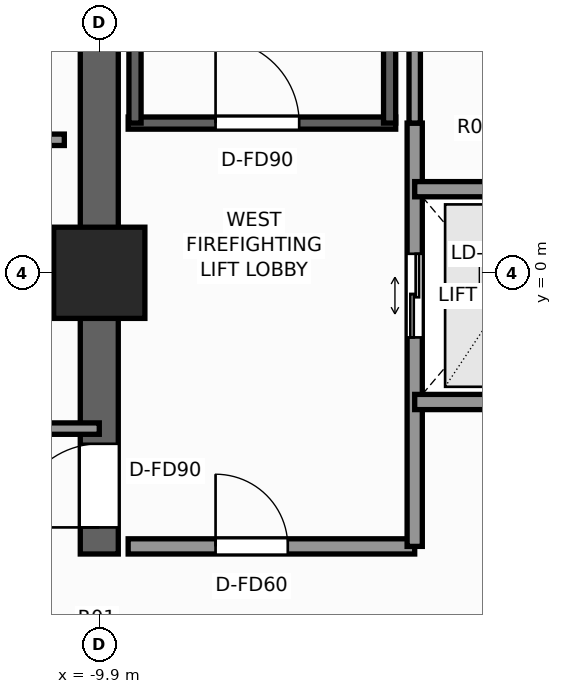
"""IFC4 building model, lengths in metres.
Left out: names, types, materials, properties, quantities, classifications, styles, units other than length and angle.
Written with IfcOpenShell. Run it as: python <this file> out.ifc"""

import sys

from ifc_helpers import new_model, si_unit, direction, frame, frame_2d, origin, origin_2d, place, context, subcontext, project, spatial, rectangle, extrude, element, fill, save


model = new_model("IFC4")
c1 = context("Model", 3, precision=1e-05, world=origin(), true_north=direction((0.0, 1.0)))
c2 = subcontext(c1, "Body", "Model", "MODEL_VIEW")
j1 = project(units=[si_unit("LENGTHUNIT", "METRE"), si_unit("PLANEANGLEUNIT", "RADIAN")], contexts=[c1])
p1 = place(None, origin())
s1 = spatial("IfcSite", under=j1, at=p1, CompositionType="ELEMENT")
p2 = place(p1, origin())
s2 = spatial("IfcBuilding", under=s1, at=p2, CompositionType="ELEMENT")
p3 = place(p2, frame((0.0, 0.0, 125.0)))
s3 = spatial("IfcBuildingStorey", under=s2, at=p3, CompositionType="ELEMENT", Elevation=125.0)
p4 = place(p3, frame((-9.9, -3.7, 0.0), z_axis=(0.0, 0.0, 1.0), x_axis=(0.0, 1.0, 0.0)))
e1 = element("IfcWall", 1, at=p4, inside=s3, PredefinedType="SHEAR", context=c2, shape_type="SweptSolid", body=[
    extrude(rectangle(XDim=13.35, YDim=0.5, at=frame_2d((6.675, 0.0))), origin(), (0.0, 0.0, 1.0), 3.3),
])
p5 = place(p4, frame((0.35, 0.0, 0.0)))
e2 = element("IfcOpeningElement", 2, at=p5, cuts=e1, PredefinedType="OPENING", context=c2, shape_type="SweptSolid", body=[
    extrude(rectangle(XDim=1.1, YDim=2.2, at=frame_2d((0.55, 1.1))), frame((0.0, 0.26, 0.0), z_axis=(0.0, -1.0, 0.0), x_axis=(1.0, 0.0, 0.0)), (0.0, 0.0, 1.0), 0.52),
])
p6 = place(p3, frame((-9.9, 0.0, 0.0), z_axis=(0.0, 0.0, 1.0), x_axis=(1.0, 0.0, 0.0)))
e3 = element("IfcColumn", 3, at=p6, inside=s3, PredefinedType="COLUMN", context=c2, shape_type="SweptSolid", body=[
    extrude(rectangle(XDim=1.2, YDim=1.2, at=origin_2d()), origin(), (0.0, 0.0, 1.0), 3.3),
])
p7 = place(p3, frame((-9.52, 1.97, 0.0), z_axis=(0.0, 0.0, 1.0), x_axis=(1.0, 0.0, 0.0)))
e4 = element("IfcWall", 4, at=p7, inside=s3, PredefinedType="SHEAR", context=c2, shape_type="SweptSolid", body=[
    extrude(rectangle(XDim=3.52, YDim=0.16, at=frame_2d((1.76, 0.0))), origin(), (0.0, 0.0, 1.0), 3.3),
])
p8 = place(p7, frame((1.15, 0.0, 0.0)))
e5 = element("IfcOpeningElement", 5, at=p8, cuts=e4, PredefinedType="OPENING", context=c2, shape_type="SweptSolid", body=[
    extrude(rectangle(XDim=1.1, YDim=2.2, at=frame_2d((0.55, 1.1))), frame((0.0, 0.09, 0.0), z_axis=(0.0, -1.0, 0.0), x_axis=(1.0, 0.0, 0.0)), (0.0, 0.0, 1.0), 0.18),
])
for number, where, z_axis, x_axis in (
    (6, (-9.43, 1.97, 0.0), (0.0, 0.0, 1.0), (0.0, 1.0, 0.0)),
    (7, (-6.08, 1.97, 0.0), (0.0, 0.0, 1.0), (0.0, 1.0, 0.0)),
):
    element("IfcWall", number, at=place(p3, frame(where, z_axis=z_axis, x_axis=x_axis)), inside=s3, PredefinedType="SHEAR", context=c2, shape_type="SweptSolid", body=[
        extrude(rectangle(XDim=7.56, YDim=0.16, at=frame_2d((3.78, 0.0))), origin(), (0.0, 0.0, 1.0), 3.3),
    ])
p9 = place(p3, frame((-9.52, -3.6, 0.0), z_axis=(0.0, 0.0, 1.0), x_axis=(1.0, 0.0, 0.0)))
e8 = element("IfcWall", 8, at=p9, inside=s3, PredefinedType="SOLIDWALL", context=c2, shape_type="SweptSolid", body=[
    extrude(rectangle(XDim=3.77, YDim=0.2, at=frame_2d((1.885, 0.0))), origin(), (0.0, 0.0, 1.0), 3.1),
])
p10 = place(p9, frame((1.15, 0.0, 0.0)))
e9 = element("IfcOpeningElement", 9, at=p10, cuts=e8, PredefinedType="OPENING", context=c2, shape_type="SweptSolid", body=[
    extrude(rectangle(XDim=0.95, YDim=2.06, at=frame_2d((0.475, 1.03))), frame((0.0, 0.11, 0.0), z_axis=(0.0, -1.0, 0.0), x_axis=(1.0, 0.0, 0.0)), (0.0, 0.0, 1.0), 0.22),
])
p11 = place(p3, frame((-5.75, -3.6, 0.0), z_axis=(0.0, 0.0, 1.0), x_axis=(0.0, 1.0, 0.0)))
e10 = element("IfcWall", 10, at=p11, inside=s3, PredefinedType="SOLIDWALL", context=c2, shape_type="SweptSolid", body=[
    extrude(rectangle(XDim=5.57, YDim=0.2, at=frame_2d((2.785, 0.0))), origin(), (0.0, 0.0, 1.0), 2.735),
])
p12 = place(p11, frame((2.75, 0.0, 0.0)))
e11 = element("IfcOpeningElement", 11, at=p12, cuts=e10, PredefinedType="OPENING", context=c2, shape_type="SweptSolid", body=[
    extrude(rectangle(XDim=1.1, YDim=2.2, at=frame_2d((0.55, 1.1))), frame((0.0, 0.11, 0.0), z_axis=(0.0, -1.0, 0.0), x_axis=(1.0, 0.0, 0.0)), (0.0, 0.0, 1.0), 0.22),
])
for number, where, z_axis, x_axis in (
    (12, (-5.75, -1.7, 0.0), (0.0, 0.0, 1.0), (1.0, 0.0, 0.0)),
    (13, (-5.75, 1.1, 0.0), (0.0, 0.0, 1.0), (1.0, 0.0, 0.0)),
):
    element("IfcWall", number, at=place(p3, frame(where, z_axis=z_axis, x_axis=x_axis)), inside=s3, PredefinedType="SOLIDWALL", context=c2, shape_type="SweptSolid", body=[
        extrude(rectangle(XDim=2.4, YDim=0.2, at=frame_2d((1.2, 0.0))), origin(), (0.0, 0.0, 1.0), 3.1),
    ])
p13 = place(p3, frame((-5.75, 1.97, 0.0), z_axis=(0.0, 0.0, 1.0), x_axis=(0.0, 1.0, 0.0)))
e14 = element("IfcWall", 14, at=p13, inside=s3, PredefinedType="PARTITIONING", context=c2, shape_type="SweptSolid", body=[
    extrude(rectangle(XDim=2.33, YDim=0.15, at=frame_2d((1.165, 0.0))), origin(), (0.0, 0.0, 1.0), 2.735),
])
p14 = place(p3, frame((-12.58, -2.05, 0.0), z_axis=(0.0, 0.0, 1.0), x_axis=(1.0, 0.0, 0.0)))
e15 = element("IfcWall", 15, at=p14, inside=s3, PredefinedType="PARTITIONING", context=c2, shape_type="SweptSolid", body=[
    extrude(rectangle(XDim=2.68, YDim=0.15, at=frame_2d((1.34, 0.0))), origin(), (0.0, 0.0, 1.0), 3.1),
])
p15 = place(p3, frame((-19.08, 1.75, 0.0), z_axis=(0.0, 0.0, 1.0), x_axis=(1.0, 0.0, 0.0)))
e16 = element("IfcWall", 16, at=p15, inside=s3, PredefinedType="PARTITIONING", context=c2, shape_type="SweptSolid", body=[
    extrude(rectangle(XDim=8.72, YDim=0.15, at=frame_2d((4.36, 0.0))), origin(), (0.0, 0.0, 1.0), 2.469),
])
p16 = place(p8, origin())
e17 = element("IfcDoor", 17, at=p16, inside=s3, OperationType="SINGLE_SWING_LEFT", PredefinedType="DOOR", context=c2, shape_type="SweptSolid", body=[
    extrude(rectangle(XDim=1.1, YDim=2.2, at=frame_2d((0.55, 1.1))), frame((0.0, 0.025, 0.0), z_axis=(0.0, -1.0, 0.0), x_axis=(1.0, 0.0, 0.0)), (0.0, 0.0, 1.0), 0.05),
])
fill(e5, e17)
p17 = place(p5, origin())
e18 = element("IfcDoor", 18, at=p17, inside=s3, OperationType="SINGLE_SWING_LEFT", PredefinedType="DOOR", context=c2, shape_type="SweptSolid", body=[
    extrude(rectangle(XDim=1.1, YDim=2.2, at=frame_2d((0.55, 1.1))), frame((0.0, 0.025, 0.0), z_axis=(0.0, -1.0, 0.0), x_axis=(1.0, 0.0, 0.0)), (0.0, 0.0, 1.0), 0.05),
])
fill(e2, e18)
p18 = place(p12, origin())
e19 = element("IfcDoor", 19, at=p18, inside=s3, OperationType="DOUBLE_DOOR_SLIDING", PredefinedType="DOOR", context=c2, shape_type="SweptSolid", body=[
    extrude(rectangle(XDim=1.1, YDim=2.2, at=frame_2d((0.55, 1.1))), frame((0.0, 0.025, 0.0), z_axis=(0.0, -1.0, 0.0), x_axis=(1.0, 0.0, 0.0)), (0.0, 0.0, 1.0), 0.05),
])
fill(e11, e19)
p19 = place(p10, origin())
e20 = element("IfcDoor", 20, at=p19, inside=s3, OperationType="SINGLE_SWING_LEFT", PredefinedType="DOOR", context=c2, shape_type="SweptSolid", body=[
    extrude(rectangle(XDim=0.95, YDim=2.06, at=frame_2d((0.475, 1.03))), frame((0.0, 0.025, 0.0), z_axis=(0.0, -1.0, 0.0), x_axis=(1.0, 0.0, 0.0)), (0.0, 0.0, 1.0), 0.05),
])
fill(e9, e20)
save(model, sys.argv[1])
